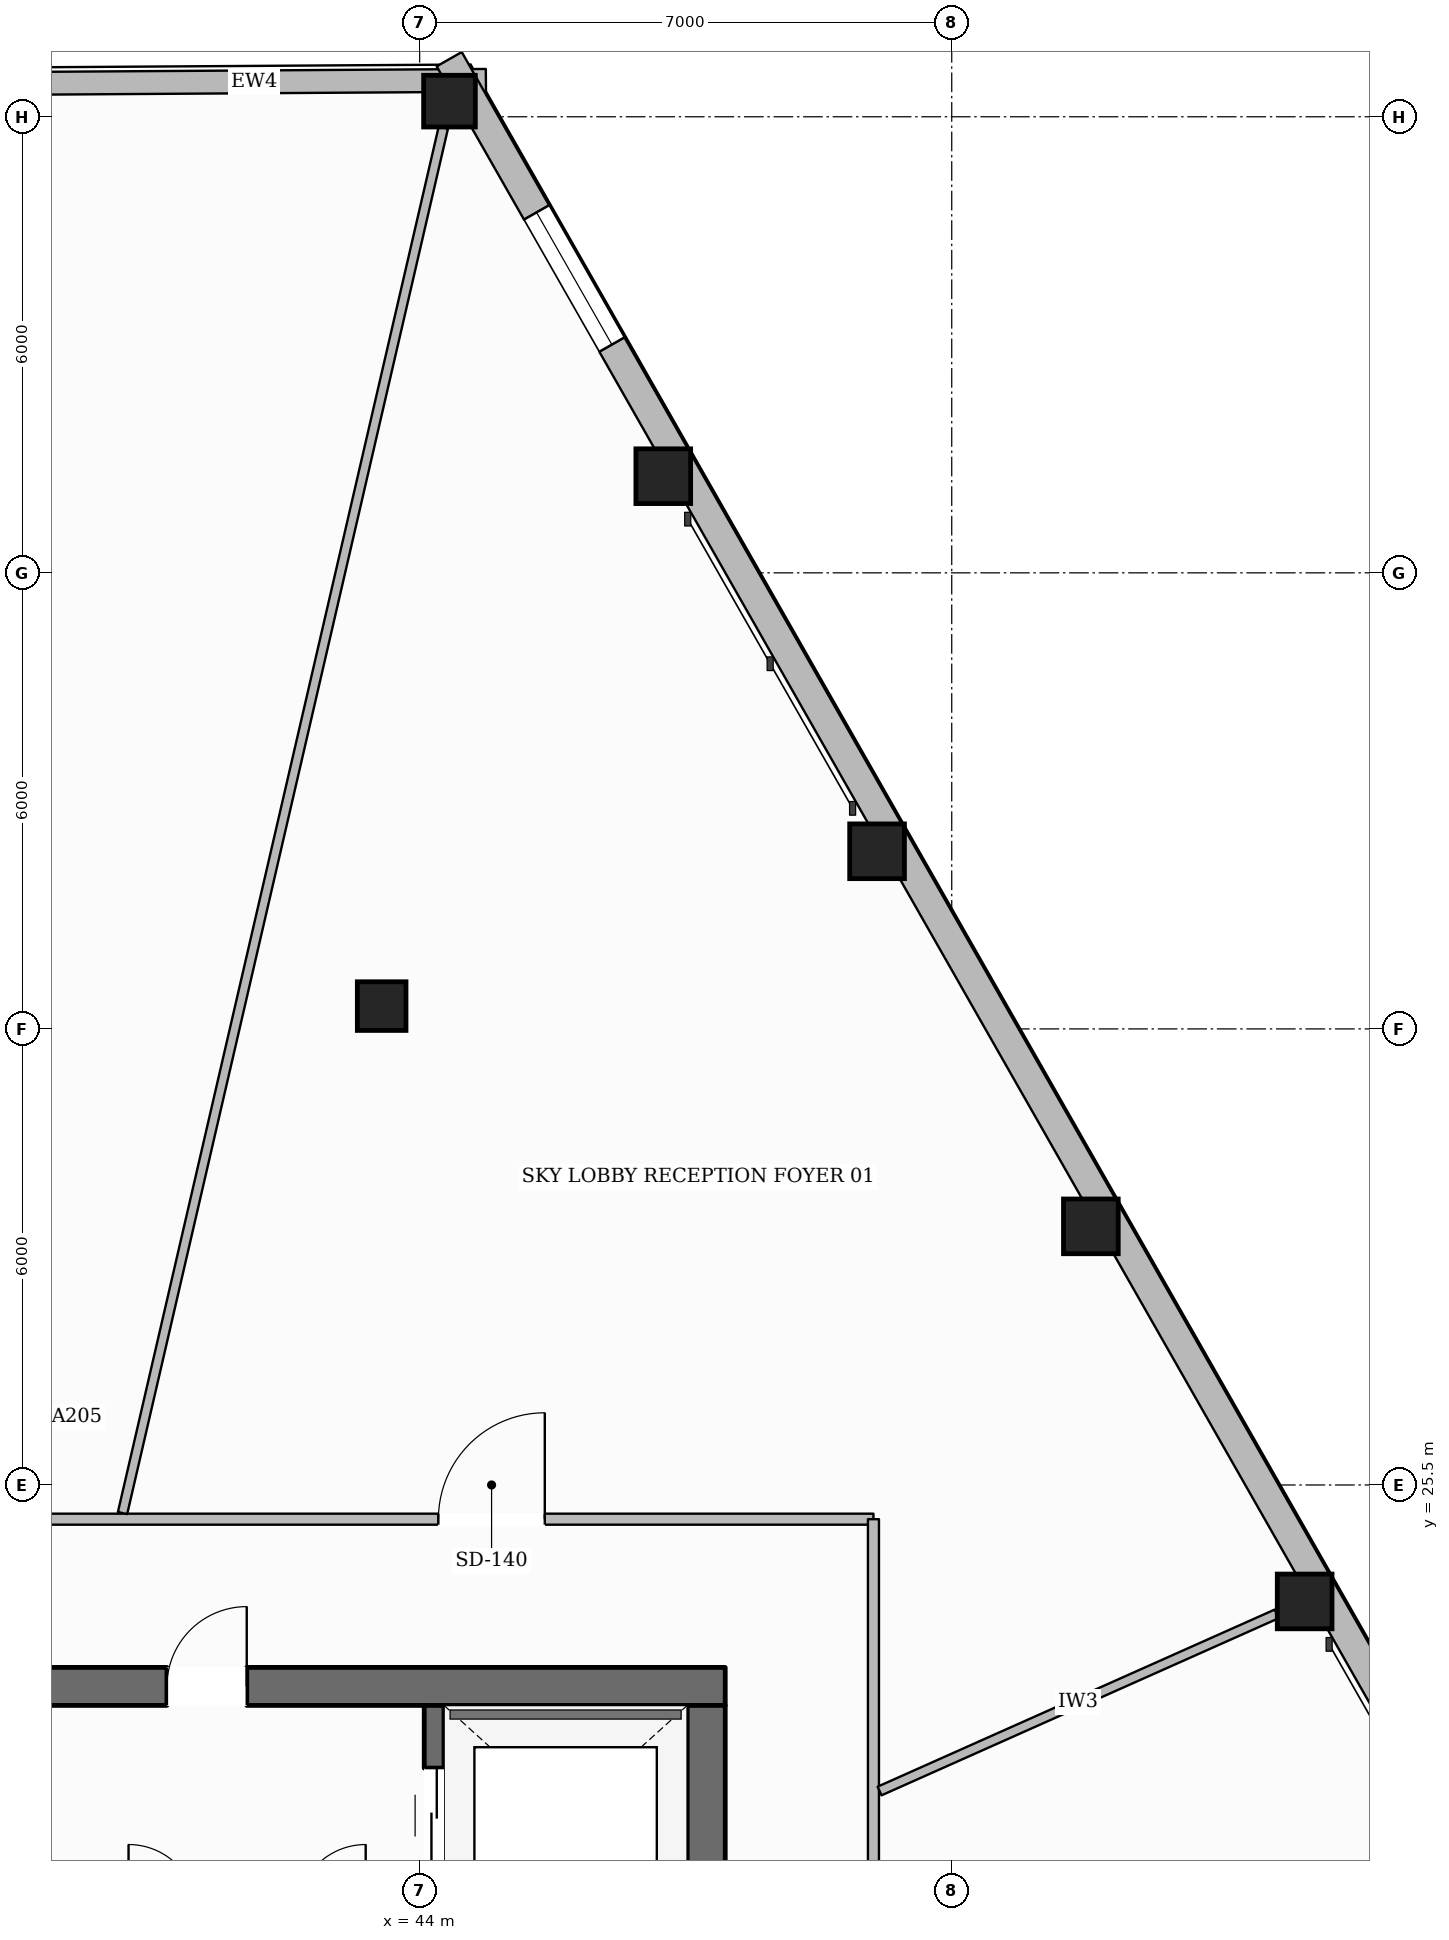
"""IFC4 building model, lengths in metres.
Left out: names, types, materials, properties, quantities, classifications, styles, units other than length and angle.
Written with IfcOpenShell. Run it as: python <this file> out.ifc"""

import sys

from ifc_helpers import new_model, si_unit, direction, frame, frame_2d, origin, origin_2d, place, context, subcontext, project, spatial, rectangle, hollow_rectangle, extrude, element, fill, save


model = new_model("IFC4")
c1 = context("Model", 3, precision=1e-05, world=origin(), true_north=direction((0.0, 1.0)))
c2 = subcontext(c1, "Body", "Model", "MODEL_VIEW")
j1 = project(units=[si_unit("LENGTHUNIT", "METRE"), si_unit("PLANEANGLEUNIT", "RADIAN")], contexts=[c1])
p1 = place(None, origin())
s1 = spatial("IfcSite", under=j1, at=p1, CompositionType="ELEMENT")
p2 = place(p1, origin())
s2 = spatial("IfcBuilding", under=s1, at=p2, CompositionType="ELEMENT")
p3 = place(p2, frame((0.0, 0.0, 80.5)))
s3 = spatial("IfcBuildingStorey", under=s2, at=p3, CompositionType="ELEMENT", Elevation=80.5)
p4 = place(p3, frame((27.98, 22.85, 0.0), z_axis=(0.0, 0.0, 1.0), x_axis=(1.0, 0.0, 0.0)))
e1 = element("IfcWall", 1, at=p4, inside=s3, PredefinedType="SOLIDWALL", context=c2, shape_type="SweptSolid", body=[
    extrude(rectangle(XDim=20.04, YDim=0.5, at=frame_2d((10.02, 0.0))), origin(), (0.0, 0.0, 1.0), 4.75),
])
p5 = place(p4, frame((6.295, 0.0, 0.0)))
e2 = element("IfcOpeningElement", 2, at=p5, cuts=e1, PredefinedType="OPENING", context=c2, shape_type="SweptSolid", body=[
    extrude(rectangle(XDim=1.05, YDim=2.15, at=frame_2d((0.525, 1.075))), frame((0.0, 0.26, 0.0), z_axis=(0.0, -1.0, 0.0), x_axis=(1.0, 0.0, 0.0)), (0.0, 0.0, 1.0), 0.52),
])
p6 = place(p4, frame((12.695, 0.0, 0.0)))
e3 = element("IfcOpeningElement", 3, at=p6, cuts=e1, PredefinedType="OPENING", context=c2, shape_type="SweptSolid", body=[
    extrude(rectangle(XDim=1.05, YDim=2.15, at=frame_2d((0.525, 1.075))), frame((0.0, 0.26, 0.0), z_axis=(0.0, -1.0, 0.0), x_axis=(1.0, 0.0, 0.0)), (0.0, 0.0, 1.0), 0.52),
])
p7 = place(p3, frame((47.77, 9.6, 0.0), z_axis=(0.0, 0.0, 1.0), x_axis=(0.0, 1.0, 0.0)))
e4 = element("IfcWall", 4, at=p7, inside=s3, PredefinedType="SOLIDWALL", context=c2, shape_type="SweptSolid", body=[
    extrude(rectangle(XDim=13.0, YDim=0.5, at=frame_2d((6.5, 0.0))), origin(), (0.0, 0.0, 1.0), 4.75),
])
p8 = place(p7, frame((0.2, 0.0, 0.0)))
e5 = element("IfcOpeningElement", 5, at=p8, cuts=e4, PredefinedType="OPENING", context=c2, shape_type="SweptSolid", body=[
    extrude(rectangle(XDim=1.1, YDim=2.15, at=frame_2d((0.55, 1.075))), frame((0.0, 0.26, 0.0), z_axis=(0.0, -1.0, 0.0), x_axis=(1.0, 0.0, 0.0)), (0.0, 0.0, 1.0), 0.52),
])
p9 = place(p7, frame((8.4, 0.0, 0.0)))
e6 = element("IfcOpeningElement", 6, at=p9, cuts=e4, PredefinedType="OPENING", context=c2, shape_type="SweptSolid", body=[
    extrude(rectangle(XDim=0.9, YDim=2.1, at=frame_2d((0.45, 1.05))), frame((0.0, 0.26, 0.0), z_axis=(0.0, -1.0, 0.0), x_axis=(1.0, 0.0, 0.0)), (0.0, 0.0, 1.0), 0.52),
])
p10 = place(p3, frame((44.19, 9.6, 0.0), z_axis=(0.0, 0.0, 1.0), x_axis=(0.0, 1.0, 0.0)))
e7 = element("IfcWall", 7, at=p10, inside=s3, PredefinedType="SHEAR", context=c2, shape_type="SweptSolid", body=[
    extrude(rectangle(XDim=13.0, YDim=0.26, at=frame_2d((6.5, 0.0))), origin(), (0.0, 0.0, 1.0), 4.75),
])
p11 = place(p10, frame((10.925, 0.0, 0.0)))
e8 = element("IfcOpeningElement", 8, at=p11, cuts=e7, PredefinedType="OPENING", context=c2, shape_type="SweptSolid", body=[
    extrude(rectangle(XDim=1.25, YDim=2.25, at=frame_2d((0.625, 1.125))), frame((0.0, 0.14, 0.0), z_axis=(0.0, -1.0, 0.0), x_axis=(1.0, 0.0, 0.0)), (0.0, 0.0, 1.0), 0.28),
])
for number, where, z_axis, x_axis in (
    (9, (55.643, 23.968, 0.0), (0.0, 0.0, 1.0), (1.0, 0.0, 0.0)),
    (10, (52.83, 28.902, 0.0), (0.0, 0.0, 1.0), (1.0, 0.0, 0.0)),
    (11, (50.018, 33.837, 0.0), (0.0, 0.0, 1.0), (1.0, 0.0, 0.0)),
    (12, (47.205, 38.771, 0.0), (0.0, 0.0, 1.0), (1.0, 0.0, 0.0)),
):
    element("IfcColumn", number, at=place(p3, frame(where, z_axis=z_axis, x_axis=x_axis)), inside=s3, PredefinedType="COLUMN", context=c2, shape_type="SweptSolid", body=[
        extrude(hollow_rectangle(XDim=0.72, YDim=0.72, WallThickness=0.032, at=origin_2d()), origin(), (0.0, 0.0, 1.0), 4.75),
    ])
p12 = place(p3, frame((44.392, 43.706, 0.0), z_axis=(0.0, 0.0, 1.0), x_axis=(1.0, 0.0, 0.0)))
e13 = element("IfcColumn", 13, at=p12, inside=s3, PredefinedType="COLUMN", context=c2, shape_type="SweptSolid", body=[
    extrude(hollow_rectangle(XDim=0.68, YDim=0.68, WallThickness=0.03, at=origin_2d()), origin(), (0.0, 0.0, 1.0), 4.75),
])
p13 = place(p3, frame((43.5, 31.8, 0.0), z_axis=(0.0, 0.0, 1.0), x_axis=(1.0, 0.0, 0.0)))
e14 = element("IfcColumn", 14, at=p13, inside=s3, PredefinedType="COLUMN", context=c2, shape_type="SweptSolid", body=[
    extrude(hollow_rectangle(XDim=0.64, YDim=0.64, WallThickness=0.028, at=origin_2d()), origin(), (0.0, 0.0, 1.0), 4.75),
])
p14 = place(p3, frame((30.981, 43.89, 0.0), z_axis=(0.0, 0.0, 1.0), x_axis=(0.999979308796, 0.006432882677, 0.0)))
e15 = element("IfcWall", 15, at=p14, inside=s3, PredefinedType="STANDARD", context=c2, shape_type="SweptSolid", body=[
    extrude(rectangle(XDim=13.89, YDim=0.3, at=frame_2d((6.945, 0.0))), origin(), (0.0, 0.0, 1.0), 4.209),
])
p15 = place(p14, frame((6.345, 0.0, 0.65)))
e16 = element("IfcOpeningElement", 16, at=p15, cuts=e15, PredefinedType="OPENING", context=c2, shape_type="SweptSolid", body=[
    extrude(rectangle(XDim=1.2, YDim=1.7, at=frame_2d((0.6, 0.85))), frame((0.0, 0.16, 0.0), z_axis=(0.0, -1.0, 0.0), x_axis=(1.0, 0.0, 0.0)), (0.0, 0.0, 1.0), 0.32),
])
p16 = place(p3, frame((44.389, 44.257, 0.0), z_axis=(0.0, 0.0, 1.0), x_axis=(0.495210354805, -0.868773102999, 0.0)))
e17 = element("IfcWall", 17, at=p16, inside=s3, PredefinedType="STANDARD", context=c2, shape_type="SweptSolid", body=[
    extrude(rectangle(XDim=35.035, YDim=0.38, at=frame_2d((17.518, 0.0))), origin(), (0.0, 0.0, 1.0), 4.209),
])
p17 = place(p16, frame((30.72, 0.0, 0.65)))
e18 = element("IfcOpeningElement", 18, at=p17, cuts=e17, PredefinedType="OPENING", context=c2, shape_type="SweptSolid", body=[
    extrude(rectangle(XDim=2.0, YDim=2.25, at=frame_2d((1.0, 1.125))), frame((0.0, 0.2, 0.0), z_axis=(0.0, -1.0, 0.0), x_axis=(1.0, 0.0, 0.0)), (0.0, 0.0, 1.0), 0.4),
])
p18 = place(p16, frame((2.321, 0.0, 0.65)))
e19 = element("IfcOpeningElement", 19, at=p18, cuts=e17, PredefinedType="OPENING", context=c2, shape_type="SweptSolid", body=[
    extrude(rectangle(XDim=2.0, YDim=2.25, at=frame_2d((1.0, 1.125))), frame((0.0, 0.2, 0.0), z_axis=(0.0, -1.0, 0.0), x_axis=(1.0, 0.0, 0.0)), (0.0, 0.0, 1.0), 0.4),
])
p19 = place(p3, frame((39.0, 25.05, 0.0), z_axis=(0.0, 0.0, 1.0), x_axis=(1.0, 0.0, 0.0)))
e20 = element("IfcWall", 20, at=p19, inside=s3, PredefinedType="PARTITIONING", context=c2, shape_type="SweptSolid", body=[
    extrude(rectangle(XDim=10.97, YDim=0.145, at=frame_2d((5.485, 0.0))), origin(), (0.0, 0.0, 1.0), 4.75),
])
p20 = place(p19, frame((5.246, 0.0, 0.0)))
e21 = element("IfcOpeningElement", 21, at=p20, cuts=e20, PredefinedType="OPENING", context=c2, shape_type="SweptSolid", body=[
    extrude(rectangle(XDim=1.4, YDim=2.2, at=frame_2d((0.7, 1.1))), frame((0.0, 0.083, 0.0), z_axis=(0.0, -1.0, 0.0), x_axis=(1.0, 0.0, 0.0)), (0.0, 0.0, 1.0), 0.165),
])
p21 = place(p3, frame((49.97, 25.05, 0.0), z_axis=(0.0, 0.0, 1.0), x_axis=(0.0, -1.0, 0.0)))
e22 = element("IfcWall", 22, at=p21, inside=s3, PredefinedType="PARTITIONING", context=c2, shape_type="SweptSolid", body=[
    extrude(rectangle(XDim=15.9, YDim=0.145, at=frame_2d((7.95, 0.0))), origin(), (0.0, 0.0, 1.0), 4.438),
])
p22 = place(p21, frame((8.955, 0.0, 0.0)))
e23 = element("IfcOpeningElement", 23, at=p22, cuts=e22, PredefinedType="OPENING", context=c2, shape_type="SweptSolid", body=[
    extrude(rectangle(XDim=1.4, YDim=2.2, at=frame_2d((0.7, 1.1))), frame((0.0, 0.083, 0.0), z_axis=(0.0, -1.0, 0.0), x_axis=(1.0, 0.0, 0.0)), (0.0, 0.0, 1.0), 0.165),
])
p23 = place(p3, frame((50.051, 21.474, 0.0), z_axis=(0.0, 0.0, 1.0), x_axis=(0.91329866802, 0.407290489692, 0.0)))
e24 = element("IfcWall", 24, at=p23, inside=s3, PredefinedType="PARTITIONING", context=c2, shape_type="SweptSolid", body=[
    extrude(rectangle(XDim=5.72, YDim=0.125, at=frame_2d((2.86, 0.0))), origin(), (0.0, 0.0, 1.0), 4.291),
])
p24 = place(p3, frame((40.091, 25.131, 0.0), z_axis=(0.0, 0.0, 1.0), x_axis=(0.225578020125, 0.974225105834, 0.0)))
e25 = element("IfcWall", 25, at=p24, inside=s3, PredefinedType="PARTITIONING", context=c2, shape_type="SweptSolid", body=[
    extrude(rectangle(XDim=18.709, YDim=0.125, at=frame_2d((9.355, 0.0))), origin(), (0.0, 0.0, 1.0), 4.75),
])
p25 = place(p18, origin())
e26 = element("IfcWindow", 26, at=p25, inside=s3, PartitioningType="SINGLE_PANEL", PredefinedType="WINDOW", context=c2, shape_type="SweptSolid", body=[
    extrude(rectangle(XDim=2.0, YDim=2.25, at=frame_2d((1.0, 1.125))), frame((0.0, 0.03, 0.0), z_axis=(0.0, -1.0, 0.0), x_axis=(1.0, 0.0, 0.0)), (0.0, 0.0, 1.0), 0.06),
])
fill(e19, e26)
p26 = place(p6, origin())
e27 = element("IfcDoor", 27, at=p26, inside=s3, OperationType="SINGLE_SWING_RIGHT", PredefinedType="DOOR", context=c2, shape_type="SweptSolid", body=[
    extrude(rectangle(XDim=1.05, YDim=2.15, at=frame_2d((0.525, 1.075))), frame((0.0, 0.025, 0.0), z_axis=(0.0, -1.0, 0.0), x_axis=(1.0, 0.0, 0.0)), (0.0, 0.0, 1.0), 0.05),
])
fill(e3, e27)
p27 = place(p11, origin())
e28 = element("IfcDoor", 28, at=p27, inside=s3, OperationType="DOUBLE_DOOR_SLIDING", PredefinedType="DOOR", context=c2, shape_type="SweptSolid", body=[
    extrude(rectangle(XDim=1.25, YDim=2.25, at=frame_2d((0.625, 1.125))), frame((0.0, 0.025, 0.0), z_axis=(0.0, -1.0, 0.0), x_axis=(1.0, 0.0, 0.0)), (0.0, 0.0, 1.0), 0.05),
])
fill(e8, e28)
p28 = place(p20, origin())
e29 = element("IfcDoor", 29, at=p28, inside=s3, OperationType="SINGLE_SWING_RIGHT", PredefinedType="DOOR", context=c2, shape_type="SweptSolid", body=[
    extrude(rectangle(XDim=1.4, YDim=2.2, at=frame_2d((0.7, 1.1))), frame((0.0, 0.025, 0.0), z_axis=(0.0, -1.0, 0.0), x_axis=(1.0, 0.0, 0.0)), (0.0, 0.0, 1.0), 0.05),
])
fill(e21, e29)
save(model, sys.argv[1])
